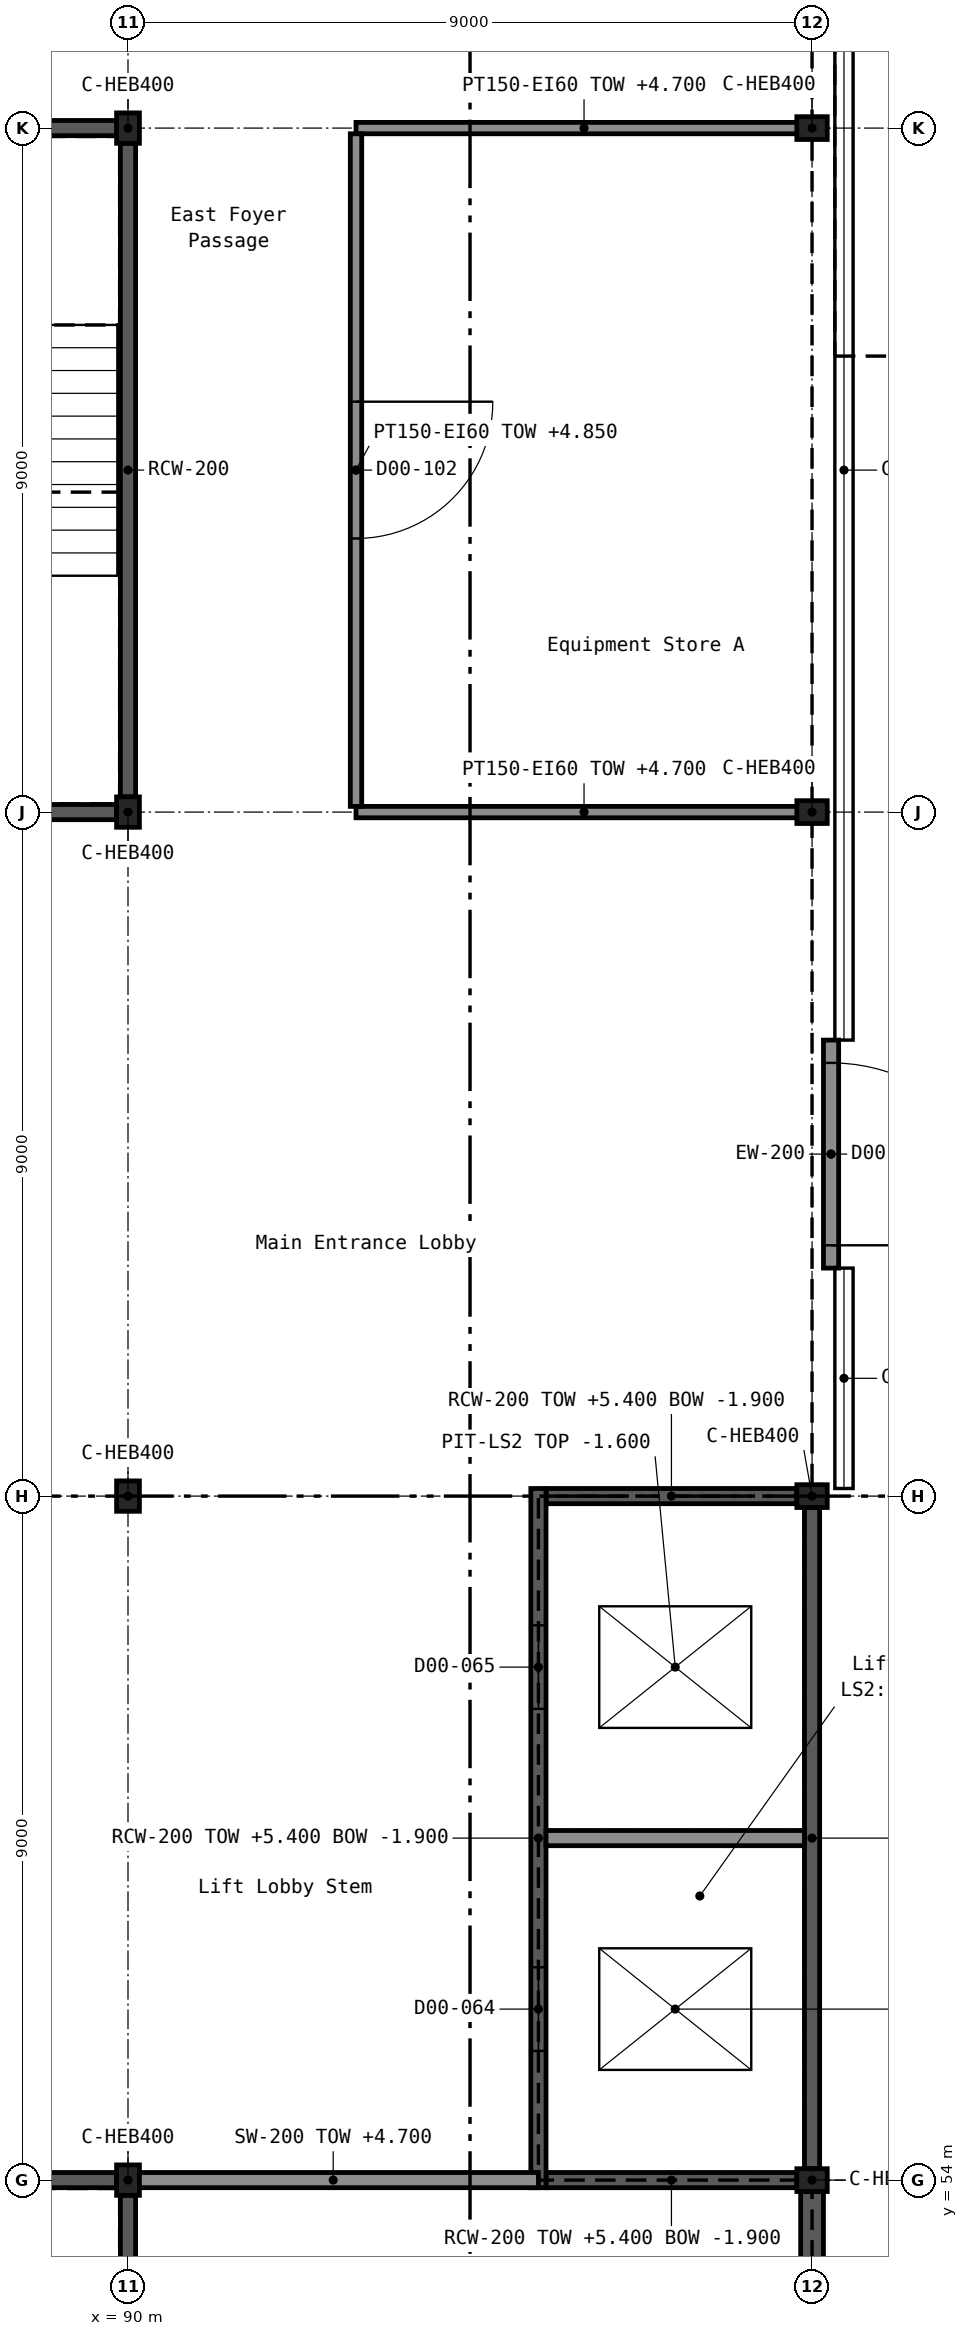
"""IFC4 building model, lengths in metres.
Left out: names, types, materials, properties, quantities, classifications, styles, units other than length and angle.
Written with IfcOpenShell. Run it as: python <this file> out.ifc"""

import sys

from ifc_helpers import new_model, si_unit, direction, frame, frame_2d, origin, origin_2d, place, context, subcontext, project, spatial, rectangle, i_section, extrude, element, fill, save


model = new_model("IFC4")
c1 = context("Model", 3, precision=1e-05, world=origin(), true_north=direction((0.0, 1.0)))
c2 = subcontext(c1, "Body", "Model", "MODEL_VIEW")
j1 = project(units=[si_unit("LENGTHUNIT", "METRE"), si_unit("PLANEANGLEUNIT", "RADIAN")], contexts=[c1])
p1 = place(None, origin())
s1 = spatial("IfcSite", under=j1, at=p1, CompositionType="ELEMENT")
p2 = place(p1, origin())
s2 = spatial("IfcBuilding", under=s1, at=p2, CompositionType="ELEMENT")
p3 = place(p2, origin())
s3 = spatial("IfcBuildingStorey", under=s2, at=p3, CompositionType="ELEMENT", Elevation=0.0)
for number, where, z_axis, x_axis in (
    (1, (90.0, 54.0, -0.3), (0.0, 0.0, 1.0), (1.0, 0.0, 0.0)),
    (2, (99.0, 54.0, -0.3), (0.0, 0.0, 1.0), (0.0, 1.0, 0.0)),
    (3, (90.0, 63.0, -0.3), (0.0, 0.0, 1.0), (1.0, 0.0, 0.0)),
    (4, (99.0, 63.0, -0.3), (0.0, 0.0, 1.0), (0.0, 1.0, 0.0)),
    (5, (90.0, 72.0, -0.3), (0.0, 0.0, 1.0), (1.0, 0.0, 0.0)),
    (6, (99.0, 72.0, -0.3), (0.0, 0.0, 1.0), (0.0, 1.0, 0.0)),
    (7, (90.0, 81.0, -0.3), (0.0, 0.0, 1.0), (1.0, 0.0, 0.0)),
    (8, (99.0, 81.0, -0.3), (0.0, 0.0, 1.0), (0.0, 1.0, 0.0)),
):
    element("IfcColumn", number, at=place(p3, frame(where, z_axis=z_axis, x_axis=x_axis)), inside=s3, PredefinedType="COLUMN", context=c2, shape_type="SweptSolid", body=[
        extrude(i_section(OverallWidth=0.3, OverallDepth=0.4, WebThickness=0.013, FlangeThickness=0.024, FilletRadius=0.027, at=origin_2d()), origin(), (0.0, 0.0, 1.0), 5.7),
    ])
p4 = place(p3, frame((99.0, 45.15, -0.3), z_axis=(0.0, 0.0, 1.0), x_axis=(0.0, 1.0, 0.0)))
e9 = element("IfcWall", 9, at=p4, inside=s3, PredefinedType="SOLIDWALL", context=c2, shape_type="SweptSolid", body=[
    extrude(rectangle(XDim=8.7, YDim=0.3, at=frame_2d((4.35, 0.0))), origin(), (0.0, 0.0, 1.0), 5.55),
])
p5 = place(p3, frame((99.25, 66.0, 0.0), z_axis=(0.0, 0.0, 1.0), x_axis=(0.0, 1.0, 0.0)))
e10 = element("IfcWall", 10, at=p5, inside=s3, PredefinedType="SOLIDWALL", context=c2, shape_type="SweptSolid", body=[
    extrude(rectangle(XDim=3.0, YDim=0.2, at=frame_2d((1.5, 0.0))), origin(), (0.0, 0.0, 1.0), 5.4),
])
p6 = place(p5, frame((0.3, 0.0, 0.0)))
e11 = element("IfcOpeningElement", 11, at=p6, cuts=e10, PredefinedType="OPENING", context=c2, shape_type="SweptSolid", body=[
    extrude(rectangle(XDim=2.4, YDim=2.4, at=frame_2d((1.2, 1.2))), frame((0.0, 0.111, 0.0), z_axis=(0.0, -1.0, 0.0), x_axis=(1.0, 0.0, 0.0)), (0.0, 0.0, 1.0), 0.222),
])
p7 = place(p3, frame((81.15, 54.0, 0.0), z_axis=(0.0, 0.0, 1.0), x_axis=(1.0, 0.0, 0.0)))
e12 = element("IfcWall", 12, at=p7, inside=s3, PredefinedType="SHEAR", context=c2, shape_type="SweptSolid", body=[
    extrude(rectangle(XDim=8.7, YDim=0.2, at=frame_2d((4.35, 0.0))), origin(), (0.0, 0.0, 1.0), 5.4),
])
p8 = place(p3, frame((90.0, 45.2, 0.0), z_axis=(0.0, 0.0, 1.0), x_axis=(0.0, 1.0, 0.0)))
e13 = element("IfcWall", 13, at=p8, inside=s3, PredefinedType="SHEAR", context=c2, shape_type="SweptSolid", body=[
    extrude(rectangle(XDim=8.6, YDim=0.2, at=frame_2d((4.3, 0.0))), origin(), (0.0, 0.0, 1.0), 5.4),
])
p9 = place(p3, frame((81.15, 72.0, 0.0), z_axis=(0.0, 0.0, 1.0), x_axis=(1.0, 0.0, 0.0)))
e14 = element("IfcWall", 14, at=p9, inside=s3, PredefinedType="SHEAR", context=c2, shape_type="SweptSolid", body=[
    extrude(rectangle(XDim=8.7, YDim=0.2, at=frame_2d((4.35, 0.0))), origin(), (0.0, 0.0, 1.0), 5.4),
])
p10 = place(p3, frame((81.15, 81.0, 0.0), z_axis=(0.0, 0.0, 1.0), x_axis=(1.0, 0.0, 0.0)))
e15 = element("IfcWall", 15, at=p10, inside=s3, PredefinedType="SHEAR", context=c2, shape_type="SweptSolid", body=[
    extrude(rectangle(XDim=8.7, YDim=0.2, at=frame_2d((4.35, 0.0))), origin(), (0.0, 0.0, 1.0), 5.4),
])
p11 = place(p10, frame((3.75, 0.0, 0.0)))
e16 = element("IfcOpeningElement", 16, at=p11, cuts=e15, PredefinedType="OPENING", context=c2, shape_type="SweptSolid", body=[
    extrude(rectangle(XDim=1.2, YDim=2.1, at=frame_2d((0.6, 1.05))), frame((0.0, 0.111, 0.0), z_axis=(0.0, -1.0, 0.0), x_axis=(1.0, 0.0, 0.0)), (0.0, 0.0, 1.0), 0.222),
])
p12 = place(p3, frame((90.0, 72.2, 0.0), z_axis=(0.0, 0.0, 1.0), x_axis=(0.0, 1.0, 0.0)))
e17 = element("IfcWall", 17, at=p12, inside=s3, PredefinedType="SHEAR", context=c2, shape_type="SweptSolid", body=[
    extrude(rectangle(XDim=8.6, YDim=0.2, at=frame_2d((4.3, 0.0))), origin(), (0.0, 0.0, 1.0), 5.4),
])
for number, where, z_axis, x_axis in (
    (18, (95.5, 54.0, -1.9), (0.0, 0.0, 1.0), (1.0, 0.0, 0.0)),
    (19, (95.5, 63.0, -1.9), (0.0, 0.0, 1.0), (1.0, 0.0, 0.0)),
):
    element("IfcWall", number, at=place(p3, frame(where, z_axis=z_axis, x_axis=x_axis)), inside=s3, PredefinedType="SHEAR", context=c2, shape_type="SweptSolid", body=[
        extrude(rectangle(XDim=3.3, YDim=0.2, at=frame_2d((1.65, 0.0))), origin(), (0.0, 0.0, 1.0), 7.3),
    ])
p13 = place(p3, frame((95.4, 53.9, -1.9), z_axis=(0.0, 0.0, 1.0), x_axis=(0.0, 1.0, 0.0)))
e20 = element("IfcWall", 20, at=p13, inside=s3, PredefinedType="SHEAR", context=c2, shape_type="SweptSolid", body=[
    extrude(rectangle(XDim=9.2, YDim=0.2, at=frame_2d((4.6, 0.0))), origin(), (0.0, 0.0, 1.0), 7.3),
])
p14 = place(p13, frame((1.8, 0.0, 1.9)))
e21 = element("IfcOpeningElement", 21, at=p14, cuts=e20, PredefinedType="OPENING", context=c2, shape_type="SweptSolid", body=[
    extrude(rectangle(XDim=1.1, YDim=2.1, at=frame_2d((0.55, 1.05))), frame((0.0, 0.111, 0.0), z_axis=(0.0, -1.0, 0.0), x_axis=(1.0, 0.0, 0.0)), (0.0, 0.0, 1.0), 0.222),
])
p15 = place(p13, frame((6.3, 0.0, 1.9)))
e22 = element("IfcOpeningElement", 22, at=p15, cuts=e20, PredefinedType="OPENING", context=c2, shape_type="SweptSolid", body=[
    extrude(rectangle(XDim=1.1, YDim=2.1, at=frame_2d((0.55, 1.05))), frame((0.0, 0.111, 0.0), z_axis=(0.0, -1.0, 0.0), x_axis=(1.0, 0.0, 0.0)), (0.0, 0.0, 1.0), 0.222),
])
p16 = place(p3, frame((99.0, 54.15, -1.9), z_axis=(0.0, 0.0, 1.0), x_axis=(0.0, 1.0, 0.0)))
e23 = element("IfcWall", 23, at=p16, inside=s3, PredefinedType="SHEAR", context=c2, shape_type="SweptSolid", body=[
    extrude(rectangle(XDim=8.7, YDim=0.2, at=frame_2d((4.35, 0.0))), origin(), (0.0, 0.0, 1.0), 7.3),
])
p17 = place(p3, frame((95.5, 58.5, -1.9), z_axis=(0.0, 0.0, 1.0), x_axis=(1.0, 0.0, 0.0)))
e24 = element("IfcWall", 24, at=p17, inside=s3, PredefinedType="SOLIDWALL", context=c2, shape_type="SweptSolid", body=[
    extrude(rectangle(XDim=3.4, YDim=0.2, at=frame_2d((1.7, 0.0))), origin(), (0.0, 0.0, 1.0), 7.3),
])
p18 = place(p3, frame((90.0, 54.0, 0.0), z_axis=(0.0, 0.0, 1.0), x_axis=(1.0, 0.0, 0.0)))
e25 = element("IfcWall", 25, at=p18, inside=s3, PredefinedType="SOLIDWALL", context=c2, shape_type="SweptSolid", body=[
    extrude(rectangle(XDim=5.4, YDim=0.2, at=frame_2d((2.7, 0.0))), origin(), (0.0, 0.0, 1.0), 4.7),
])
for number, where, z_axis, x_axis in (
    (26, (93.0, 72.0, 0.0), (0.0, 0.0, 1.0), (1.0, 0.0, 0.0)),
    (27, (93.0, 81.0, 0.0), (0.0, 0.0, 1.0), (1.0, 0.0, 0.0)),
):
    element("IfcWall", number, at=place(p3, frame(where, z_axis=z_axis, x_axis=x_axis)), inside=s3, PredefinedType="PARTITIONING", context=c2, shape_type="SweptSolid", body=[
        extrude(rectangle(XDim=6.0, YDim=0.15, at=frame_2d((3.0, 0.0))), origin(), (0.0, 0.0, 1.0), 4.7),
    ])
p19 = place(p3, frame((93.0, 72.075, 0.0), z_axis=(0.0, 0.0, 1.0), x_axis=(0.0, 1.0, 0.0)))
e28 = element("IfcWall", 28, at=p19, inside=s3, PredefinedType="PARTITIONING", context=c2, shape_type="SweptSolid", body=[
    extrude(rectangle(XDim=8.85, YDim=0.15, at=frame_2d((4.425, 0.0))), origin(), (0.0, 0.0, 1.0), 4.85),
])
p20 = place(p19, frame((3.525, 0.0, 0.0)))
e29 = element("IfcOpeningElement", 29, at=p20, cuts=e28, PredefinedType="OPENING", context=c2, shape_type="SweptSolid", body=[
    extrude(rectangle(XDim=1.8, YDim=3.0, at=frame_2d((0.9, 1.5))), frame((0.0, 0.086, 0.0), z_axis=(0.0, -1.0, 0.0), x_axis=(1.0, 0.0, 0.0)), (0.0, 0.0, 1.0), 0.172),
])
p21 = place(p6, frame((2.4, 0.0, 0.0), z_axis=(0.0, 0.0, 1.0), x_axis=(-1.0, 0.0, 0.0)))
e30 = element("IfcDoor", 30, at=p21, inside=s3, OperationType="DOUBLE_DOOR_DOUBLE_SWING", PredefinedType="DOOR", context=c2, shape_type="SweptSolid", body=[
    extrude(rectangle(XDim=2.4, YDim=2.4, at=frame_2d((1.2, 1.2))), frame((0.0, 0.025, 0.0), z_axis=(0.0, -1.0, 0.0), x_axis=(1.0, 0.0, 0.0)), (0.0, 0.0, 1.0), 0.05),
])
fill(e11, e30)
p22 = place(p14, origin())
e31 = element("IfcDoor", 31, at=p22, inside=s3, OperationType="DOUBLE_DOOR_SLIDING", PredefinedType="DOOR", context=c2, shape_type="SweptSolid", body=[
    extrude(rectangle(XDim=1.1, YDim=2.1, at=frame_2d((0.55, 1.05))), frame((0.0, 0.025, 0.0), z_axis=(0.0, -1.0, 0.0), x_axis=(1.0, 0.0, 0.0)), (0.0, 0.0, 1.0), 0.05),
])
fill(e21, e31)
p23 = place(p15, origin())
e32 = element("IfcDoor", 32, at=p23, inside=s3, OperationType="DOUBLE_DOOR_SLIDING", PredefinedType="DOOR", context=c2, shape_type="SweptSolid", body=[
    extrude(rectangle(XDim=1.1, YDim=2.1, at=frame_2d((0.55, 1.05))), frame((0.0, 0.025, 0.0), z_axis=(0.0, -1.0, 0.0), x_axis=(1.0, 0.0, 0.0)), (0.0, 0.0, 1.0), 0.05),
])
fill(e22, e32)
p24 = place(p20, frame((1.8, 0.0, 0.0), z_axis=(0.0, 0.0, 1.0), x_axis=(-1.0, 0.0, 0.0)))
e33 = element("IfcDoor", 33, at=p24, inside=s3, OperationType="DOUBLE_DOOR_SINGLE_SWING", PredefinedType="DOOR", context=c2, shape_type="SweptSolid", body=[
    extrude(rectangle(XDim=1.8, YDim=3.0, at=frame_2d((0.9, 1.5))), frame((0.0, 0.025, 0.0), z_axis=(0.0, -1.0, 0.0), x_axis=(1.0, 0.0, 0.0)), (0.0, 0.0, 1.0), 0.05),
])
fill(e29, e33)
save(model, sys.argv[1])
